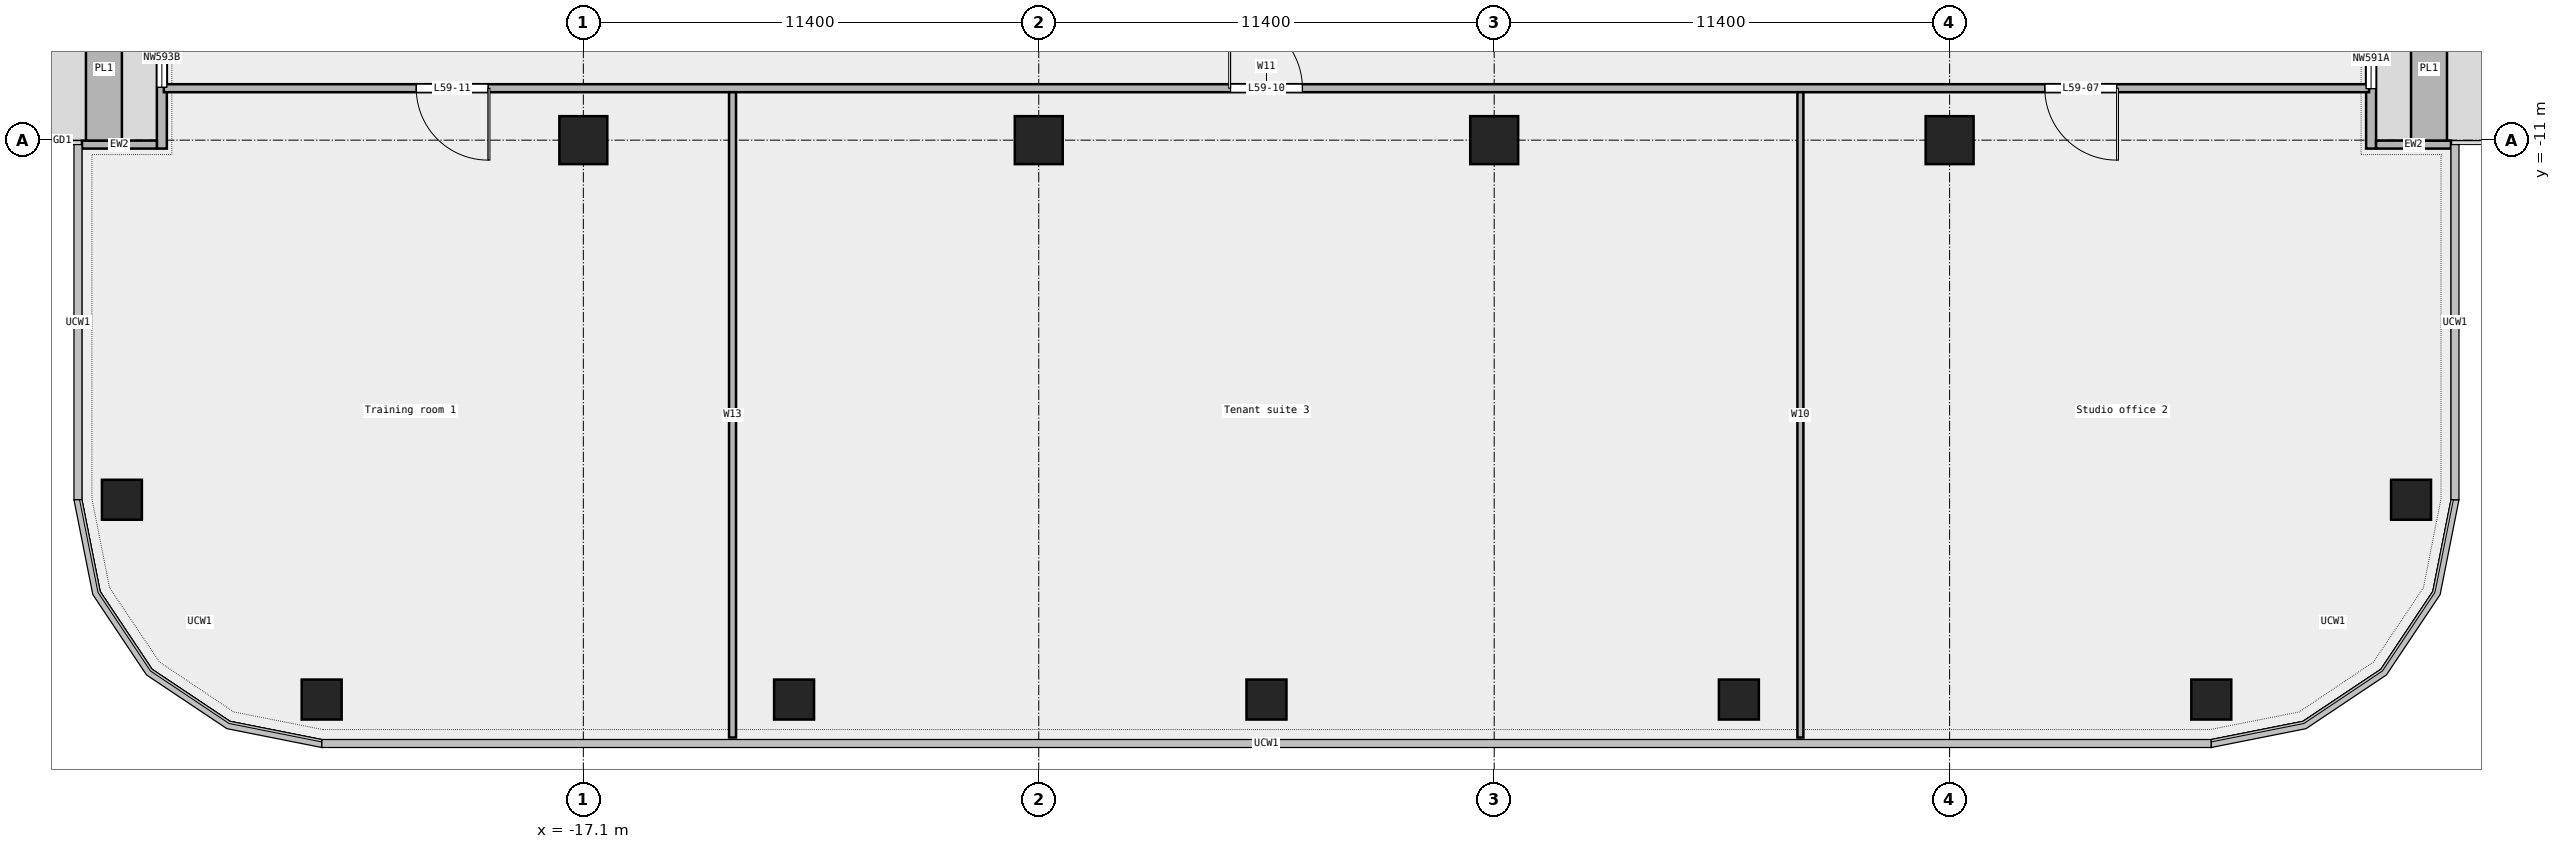
"""IFC4 building model, lengths in metres.
Left out: names, types, materials, properties, quantities, classifications, styles, units other than length and angle.
Written with IfcOpenShell. Run it as: python <this file> out.ifc"""

import sys

from ifc_helpers import new_model, si_unit, direction, frame, frame_2d, origin, origin_2d, place, context, subcontext, project, spatial, rectangle, extrude, element, fill, save


model = new_model("IFC4")
c1 = context("Model", 3, precision=1e-05, world=origin(), true_north=direction((0.0, 1.0)))
c2 = subcontext(c1, "Body", "Model", "MODEL_VIEW")
j1 = project(units=[si_unit("LENGTHUNIT", "METRE"), si_unit("PLANEANGLEUNIT", "RADIAN")], contexts=[c1])
p1 = place(None, origin())
s1 = spatial("IfcSite", under=j1, at=p1, CompositionType="ELEMENT")
p2 = place(p1, origin())
s2 = spatial("IfcBuilding", under=s1, at=p2, CompositionType="ELEMENT")
p3 = place(p2, frame((0.0, 0.0, 275.4)))
s3 = spatial("IfcBuildingStorey", under=s2, at=p3, CompositionType="ELEMENT", Elevation=275.4)
for number, where, z_axis, x_axis in (
    (1, (-23.65, -25.0, 0.0), (0.0, 0.0, 1.0), (1.0, 0.0, 0.0)),
    (2, (-11.825, -25.0, 0.0), (0.0, 0.0, 1.0), (1.0, 0.0, 0.0)),
    (3, (0.0, -25.0, 0.0), (0.0, 0.0, 1.0), (1.0, 0.0, 0.0)),
    (4, (11.825, -25.0, 0.0), (0.0, 0.0, 1.0), (1.0, 0.0, 0.0)),
    (5, (23.65, -25.0, 0.0), (0.0, 0.0, 1.0), (1.0, 0.0, 0.0)),
    (6, (28.65, -20.0, 0.0), (0.0, 0.0, 1.0), (1.0, 0.0, 0.0)),
    (7, (-28.65, -20.0, 0.0), (0.0, 0.0, 1.0), (1.0, 0.0, 0.0)),
):
    element("IfcColumn", number, at=place(p3, frame(where, z_axis=z_axis, x_axis=x_axis)), inside=s3, PredefinedType="COLUMN", context=c2, shape_type="SweptSolid", body=[
        extrude(rectangle(XDim=1.0, YDim=1.0, at=origin_2d()), origin(), (0.0, 0.0, 1.0), 3.6),
    ])
for number, where, z_axis, x_axis in (
    (8, (-17.1, -11.0, 0.0), (0.0, 0.0, 1.0), (1.0, 0.0, 0.0)),
    (9, (-5.7, -11.0, 0.0), (0.0, 0.0, 1.0), (1.0, 0.0, 0.0)),
    (10, (5.7, -11.0, 0.0), (0.0, 0.0, 1.0), (1.0, 0.0, 0.0)),
    (11, (17.1, -11.0, 0.0), (0.0, 0.0, 1.0), (1.0, 0.0, 0.0)),
):
    element("IfcColumn", number, at=place(p3, frame(where, z_axis=z_axis, x_axis=x_axis)), inside=s3, PredefinedType="COLUMN", context=c2, shape_type="SweptSolid", body=[
        extrude(rectangle(XDim=1.2, YDim=1.2, at=origin_2d()), origin(), (0.0, 0.0, 1.0), 3.6),
    ])
p4 = place(p3, frame((27.65, -11.211, 0.0), z_axis=(0.0, 0.0, 1.0), x_axis=(0.0, 1.0, 0.0)))
e12 = element("IfcWall", 12, at=p4, inside=s3, PredefinedType="STANDARD", context=c2, shape_type="SweptSolid", body=[
    extrude(rectangle(XDim=13.533, YDim=0.25, at=frame_2d((6.767, 0.0))), origin(), (0.0, 0.0, 1.0), 3.6),
])
p5 = place(p4, frame((1.5, 0.0, 0.45)))
e13 = element("IfcOpeningElement", 13, at=p5, cuts=e12, PredefinedType="OPENING", context=c2, shape_type="SweptSolid", body=[
    extrude(rectangle(XDim=1.5, YDim=2.4, at=frame_2d((0.75, 1.2))), frame((0.0, 0.137, 0.0), z_axis=(0.0, -1.0, 0.0), x_axis=(1.0, 0.0, 0.0)), (0.0, 0.0, 1.0), 0.274),
])
p6 = place(p4, frame((5.75, 0.0, 0.0)))
e14 = element("IfcOpeningElement", 14, at=p6, cuts=e12, PredefinedType="OPENING", context=c2, shape_type="SweptSolid", body=[
    extrude(rectangle(XDim=1.8, YDim=2.4, at=frame_2d((0.9, 1.2))), frame((0.0, 0.137, 0.0), z_axis=(0.0, -1.0, 0.0), x_axis=(1.0, 0.0, 0.0)), (0.0, 0.0, 1.0), 0.274),
])
p7 = place(p4, frame((10.5, 0.0, 0.45)))
e15 = element("IfcOpeningElement", 15, at=p7, cuts=e12, PredefinedType="OPENING", context=c2, shape_type="SweptSolid", body=[
    extrude(rectangle(XDim=1.5, YDim=2.4, at=frame_2d((0.75, 1.2))), frame((0.0, 0.137, 0.0), z_axis=(0.0, -1.0, 0.0), x_axis=(1.0, 0.0, 0.0)), (0.0, 0.0, 1.0), 0.274),
])
p8 = place(p3, frame((29.65, -11.111, 0.0), z_axis=(0.0, 0.0, 1.0), x_axis=(-1.0, 0.0, 0.0)))
e16 = element("IfcWall", 16, at=p8, inside=s3, PredefinedType="STANDARD", context=c2, shape_type="SweptSolid", body=[
    extrude(rectangle(XDim=1.875, YDim=0.2, at=frame_2d((0.938, 0.0))), origin(), (0.0, 0.0, 1.0), 3.6),
])
p9 = place(p3, frame((29.1, -11.011, 0.0), z_axis=(0.0, 0.0, 1.0), x_axis=(0.0, 1.0, 0.0)))
e17 = element("IfcWall", 17, at=p9, inside=s3, PredefinedType="STANDARD", context=c2, shape_type="SweptSolid", body=[
    extrude(rectangle(XDim=3.6, YDim=0.9, at=frame_2d((1.8, 0.0))), origin(), (0.0, 0.0, 1.0), 0.7),
])
p10 = place(p3, frame((-27.65, 2.322, 0.0), z_axis=(0.0, 0.0, 1.0), x_axis=(0.0, -1.0, 0.0)))
e18 = element("IfcWall", 18, at=p10, inside=s3, PredefinedType="STANDARD", context=c2, shape_type="SweptSolid", body=[
    extrude(rectangle(XDim=13.533, YDim=0.25, at=frame_2d((6.767, 0.0))), origin(), (0.0, 0.0, 1.0), 3.6),
])
p11 = place(p10, frame((1.5, 0.0, 0.45)))
e19 = element("IfcOpeningElement", 19, at=p11, cuts=e18, PredefinedType="OPENING", context=c2, shape_type="SweptSolid", body=[
    extrude(rectangle(XDim=1.5, YDim=2.4, at=frame_2d((0.75, 1.2))), frame((0.0, 0.137, 0.0), z_axis=(0.0, -1.0, 0.0), x_axis=(1.0, 0.0, 0.0)), (0.0, 0.0, 1.0), 0.274),
])
p12 = place(p10, frame((5.75, 0.0, 0.0)))
e20 = element("IfcOpeningElement", 20, at=p12, cuts=e18, PredefinedType="OPENING", context=c2, shape_type="SweptSolid", body=[
    extrude(rectangle(XDim=1.8, YDim=2.4, at=frame_2d((0.9, 1.2))), frame((0.0, 0.137, 0.0), z_axis=(0.0, -1.0, 0.0), x_axis=(1.0, 0.0, 0.0)), (0.0, 0.0, 1.0), 0.274),
])
p13 = place(p10, frame((10.5, 0.0, 0.45)))
e21 = element("IfcOpeningElement", 21, at=p13, cuts=e18, PredefinedType="OPENING", context=c2, shape_type="SweptSolid", body=[
    extrude(rectangle(XDim=1.5, YDim=2.4, at=frame_2d((0.75, 1.2))), frame((0.0, 0.137, 0.0), z_axis=(0.0, -1.0, 0.0), x_axis=(1.0, 0.0, 0.0)), (0.0, 0.0, 1.0), 0.274),
])
p14 = place(p3, frame((-29.65, -11.111, 0.0), z_axis=(0.0, 0.0, 1.0), x_axis=(1.0, 0.0, 0.0)))
e22 = element("IfcWall", 22, at=p14, inside=s3, PredefinedType="STANDARD", context=c2, shape_type="SweptSolid", body=[
    extrude(rectangle(XDim=1.875, YDim=0.2, at=frame_2d((0.938, 0.0))), origin(), (0.0, 0.0, 1.0), 3.6),
])
p15 = place(p3, frame((-29.1, -7.411, 0.0), z_axis=(0.0, 0.0, 1.0), x_axis=(0.0, -1.0, 0.0)))
e23 = element("IfcWall", 23, at=p15, inside=s3, PredefinedType="STANDARD", context=c2, shape_type="SweptSolid", body=[
    extrude(rectangle(XDim=3.6, YDim=0.9, at=frame_2d((1.8, 0.0))), origin(), (0.0, 0.0, 1.0), 0.7),
])
p16 = place(p3, frame((-27.6, -9.7, 0.0), z_axis=(0.0, 0.0, 1.0), x_axis=(1.0, 0.0, 0.0)))
e24 = element("IfcWall", 24, at=p16, inside=s3, PredefinedType="PARTITIONING", context=c2, shape_type="SweptSolid", body=[
    extrude(rectangle(XDim=55.2, YDim=0.2, at=frame_2d((27.6, 0.0))), origin(), (0.0, 0.0, 1.0), 3.6),
])
p17 = place(p16, frame((47.083, 0.0, 0.0)))
e25 = element("IfcOpeningElement", 25, at=p17, cuts=e24, PredefinedType="OPENING", context=c2, shape_type="SweptSolid", body=[
    extrude(rectangle(XDim=1.8, YDim=2.1, at=frame_2d((0.9, 1.05))), frame((0.0, 0.112, 0.0), z_axis=(0.0, -1.0, 0.0), x_axis=(1.0, 0.0, 0.0)), (0.0, 0.0, 1.0), 0.224),
])
p18 = place(p16, frame((26.7, 0.0, 0.0)))
e26 = element("IfcOpeningElement", 26, at=p18, cuts=e24, PredefinedType="OPENING", context=c2, shape_type="SweptSolid", body=[
    extrude(rectangle(XDim=1.8, YDim=2.1, at=frame_2d((0.9, 1.05))), frame((0.0, 0.112, 0.0), z_axis=(0.0, -1.0, 0.0), x_axis=(1.0, 0.0, 0.0)), (0.0, 0.0, 1.0), 0.224),
])
p19 = place(p16, frame((6.317, 0.0, 0.0)))
e27 = element("IfcOpeningElement", 27, at=p19, cuts=e24, PredefinedType="OPENING", context=c2, shape_type="SweptSolid", body=[
    extrude(rectangle(XDim=1.8, YDim=2.1, at=frame_2d((0.9, 1.05))), frame((0.0, 0.112, 0.0), z_axis=(0.0, -1.0, 0.0), x_axis=(1.0, 0.0, 0.0)), (0.0, 0.0, 1.0), 0.224),
])
p20 = place(p3, frame((-13.365, -25.95, 0.0), z_axis=(0.0, 0.0, 1.0), x_axis=(0.0, 1.0, 0.0)))
e28 = element("IfcWall", 28, at=p20, inside=s3, PredefinedType="PARTITIONING", context=c2, shape_type="SweptSolid", body=[
    extrude(rectangle(XDim=16.15, YDim=0.175, at=frame_2d((8.075, 0.0))), origin(), (0.0, 0.0, 1.0), 3.6),
])
p21 = place(p3, frame((13.365, -25.95, 0.0), z_axis=(0.0, 0.0, 1.0), x_axis=(0.0, 1.0, 0.0)))
e29 = element("IfcWall", 29, at=p21, inside=s3, PredefinedType="PARTITIONING", context=c2, shape_type="SweptSolid", body=[
    extrude(rectangle(XDim=16.15, YDim=0.15, at=frame_2d((8.075, 0.0))), origin(), (0.0, 0.0, 1.0), 3.6),
])
p22 = place(p5, origin())
e30 = element("IfcWindow", 30, at=p22, inside=s3, PartitioningType="SINGLE_PANEL", PredefinedType="WINDOW", context=c2, shape_type="SweptSolid", body=[
    extrude(rectangle(XDim=1.5, YDim=2.4, at=frame_2d((0.75, 1.2))), frame((0.0, 0.03, 0.0), z_axis=(0.0, -1.0, 0.0), x_axis=(1.0, 0.0, 0.0)), (0.0, 0.0, 1.0), 0.06),
])
fill(e13, e30)
p23 = place(p13, origin())
e31 = element("IfcWindow", 31, at=p23, inside=s3, PartitioningType="SINGLE_PANEL", PredefinedType="WINDOW", context=c2, shape_type="SweptSolid", body=[
    extrude(rectangle(XDim=1.5, YDim=2.4, at=frame_2d((0.75, 1.2))), frame((0.0, 0.03, 0.0), z_axis=(0.0, -1.0, 0.0), x_axis=(1.0, 0.0, 0.0)), (0.0, 0.0, 1.0), 0.06),
])
fill(e21, e31)
p24 = place(p17, origin())
e32 = element("IfcDoor", 32, at=p24, inside=s3, OperationType="DOUBLE_DOOR_SINGLE_SWING", PredefinedType="DOOR", context=c2, shape_type="SweptSolid", body=[
    extrude(rectangle(XDim=1.8, YDim=2.1, at=frame_2d((0.9, 1.05))), frame((0.0, 0.025, 0.0), z_axis=(0.0, -1.0, 0.0), x_axis=(1.0, 0.0, 0.0)), (0.0, 0.0, 1.0), 0.05),
])
fill(e25, e32)
p25 = place(p18, origin())
e33 = element("IfcDoor", 33, at=p25, inside=s3, OperationType="DOUBLE_DOOR_SINGLE_SWING", PredefinedType="DOOR", context=c2, shape_type="SweptSolid", body=[
    extrude(rectangle(XDim=1.8, YDim=2.1, at=frame_2d((0.9, 1.05))), frame((0.0, 0.025, 0.0), z_axis=(0.0, -1.0, 0.0), x_axis=(1.0, 0.0, 0.0)), (0.0, 0.0, 1.0), 0.05),
])
fill(e26, e33)
p26 = place(p19, origin())
e34 = element("IfcDoor", 34, at=p26, inside=s3, OperationType="DOUBLE_DOOR_SINGLE_SWING", PredefinedType="DOOR", context=c2, shape_type="SweptSolid", body=[
    extrude(rectangle(XDim=1.8, YDim=2.1, at=frame_2d((0.9, 1.05))), frame((0.0, 0.025, 0.0), z_axis=(0.0, -1.0, 0.0), x_axis=(1.0, 0.0, 0.0)), (0.0, 0.0, 1.0), 0.05),
])
fill(e27, e34)
save(model, sys.argv[1])
